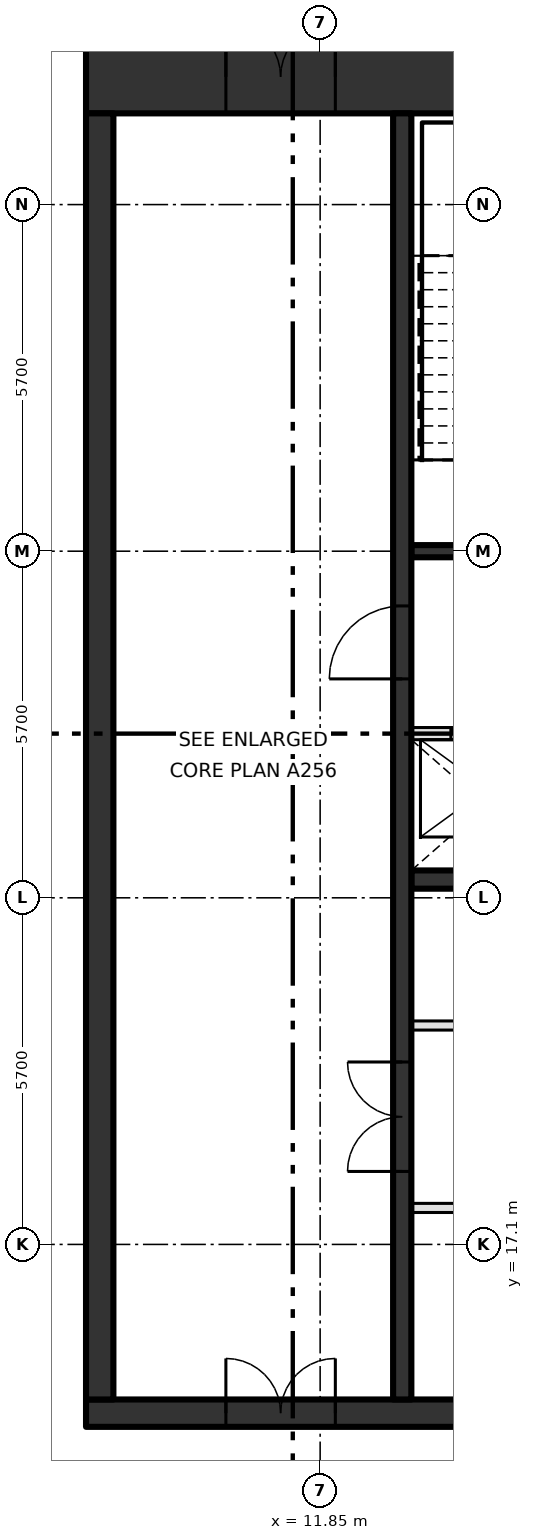
"""IFC4 building model, lengths in metres.
Left out: names, types, materials, properties, quantities, classifications, styles, units other than length and angle.
Written with IfcOpenShell. Run it as: python <this file> out.ifc"""

import sys

from ifc_helpers import new_model, si_unit, direction, frame, frame_2d, origin, place, context, subcontext, project, spatial, rectangle, extrude, element, fill, save


model = new_model("IFC4")
c1 = context("Model", 3, precision=1e-05, world=origin(), true_north=direction((0.0, 1.0)))
c2 = subcontext(c1, "Body", "Model", "MODEL_VIEW")
j1 = project(units=[si_unit("LENGTHUNIT", "METRE"), si_unit("PLANEANGLEUNIT", "RADIAN")], contexts=[c1])
p1 = place(None, origin())
s1 = spatial("IfcSite", under=j1, at=p1, CompositionType="ELEMENT")
p2 = place(p1, origin())
s2 = spatial("IfcBuilding", under=s1, at=p2, CompositionType="ELEMENT")
p3 = place(p2, frame((0.0, 0.0, 409.8)))
s3 = spatial("IfcBuildingStorey", under=s2, at=p3, CompositionType="ELEMENT", Elevation=409.8)
p4 = place(p3, frame((8.0, 14.325, -0.45), z_axis=(0.0, 0.0, 1.0), x_axis=(1.0, 0.0, 0.0)))
e1 = element("IfcWall", 1, at=p4, inside=s3, PredefinedType="SHEAR", context=c2, shape_type="SweptSolid", body=[
    extrude(rectangle(XDim=22.8, YDim=0.45, at=frame_2d((11.4, 0.0))), origin(), (0.0, 0.0, 1.0), 4.95),
])
p5 = place(p4, frame((2.3, 0.0, 0.45)))
e2 = element("IfcOpeningElement", 2, at=p5, cuts=e1, PredefinedType="OPENING", context=c2, shape_type="SweptSolid", body=[
    extrude(rectangle(XDim=1.8, YDim=2.1, at=frame_2d((0.9, 1.05))), frame((0.0, 0.235, 0.0), z_axis=(0.0, -1.0, 0.0), x_axis=(1.0, 0.0, 0.0)), (0.0, 0.0, 1.0), 0.47),
])
p6 = place(p3, frame((8.0, 36.3, -0.45), z_axis=(0.0, 0.0, 1.0), x_axis=(1.0, 0.0, 0.0)))
e3 = element("IfcWall", 3, at=p6, inside=s3, PredefinedType="SHEAR", context=c2, shape_type="SweptSolid", body=[
    extrude(rectangle(XDim=22.8, YDim=1.2, at=frame_2d((11.4, 0.0))), origin(), (0.0, 0.0, 1.0), 4.95),
])
p7 = place(p6, frame((2.3, 0.0, 0.45)))
e4 = element("IfcOpeningElement", 4, at=p7, cuts=e3, PredefinedType="OPENING", context=c2, shape_type="SweptSolid", body=[
    extrude(rectangle(XDim=1.8, YDim=2.1, at=frame_2d((0.9, 1.05))), frame((0.0, 0.61, 0.0), z_axis=(0.0, -1.0, 0.0), x_axis=(1.0, 0.0, 0.0)), (0.0, 0.0, 1.0), 1.22),
])
p8 = place(p3, frame((8.225, 14.55, -0.45), z_axis=(0.0, 0.0, 1.0), x_axis=(0.0, 1.0, 0.0)))
e5 = element("IfcWall", 5, at=p8, inside=s3, PredefinedType="SHEAR", context=c2, shape_type="SweptSolid", body=[
    extrude(rectangle(XDim=21.15, YDim=0.45, at=frame_2d((10.575, 0.0))), origin(), (0.0, 0.0, 1.0), 4.95),
])
p9 = place(p3, frame((13.35, 17.7, 0.0), z_axis=(0.0, 0.0, 1.0), x_axis=(1.0, 0.0, 0.0)))
e6 = element("IfcWall", 6, at=p9, inside=s3, PredefinedType="PARTITIONING", context=c2, shape_type="SweptSolid", body=[
    extrude(rectangle(XDim=13.425, YDim=0.15, at=frame_2d((6.712, 0.0))), origin(), (0.0, 0.0, 1.0), 4.5),
])
p10 = place(p9, frame((2.1, 0.0, 0.0)))
e7 = element("IfcOpeningElement", 7, at=p10, cuts=e6, PredefinedType="OPENING", context=c2, shape_type="SweptSolid", body=[
    extrude(rectangle(XDim=0.9, YDim=2.1, at=frame_2d((0.45, 1.05))), frame((0.0, 0.085, 0.0), z_axis=(0.0, -1.0, 0.0), x_axis=(1.0, 0.0, 0.0)), (0.0, 0.0, 1.0), 0.17),
])
p11 = place(p9, frame((8.85, 0.0, 0.0)))
e8 = element("IfcOpeningElement", 8, at=p11, cuts=e6, PredefinedType="OPENING", context=c2, shape_type="SweptSolid", body=[
    extrude(rectangle(XDim=0.9, YDim=2.1, at=frame_2d((0.45, 1.05))), frame((0.0, 0.085, 0.0), z_axis=(0.0, -1.0, 0.0), x_axis=(1.0, 0.0, 0.0)), (0.0, 0.0, 1.0), 0.17),
])
p12 = place(p3, frame((13.35, 20.7, 0.0), z_axis=(0.0, 0.0, 1.0), x_axis=(1.0, 0.0, 0.0)))
e9 = element("IfcWall", 9, at=p12, inside=s3, PredefinedType="PARTITIONING", context=c2, shape_type="SweptSolid", body=[
    extrude(rectangle(XDim=13.425, YDim=0.15, at=frame_2d((6.712, 0.0))), origin(), (0.0, 0.0, 1.0), 4.5),
])
p13 = place(p12, frame((4.8, 0.0, 0.0)))
e10 = element("IfcOpeningElement", 10, at=p13, cuts=e9, PredefinedType="OPENING", context=c2, shape_type="SweptSolid", body=[
    extrude(rectangle(XDim=0.9, YDim=2.1, at=frame_2d((0.45, 1.05))), frame((0.0, 0.085, 0.0), z_axis=(0.0, -1.0, 0.0), x_axis=(1.0, 0.0, 0.0)), (0.0, 0.0, 1.0), 0.17),
])
p14 = place(p12, frame((11.55, 0.0, 0.0)))
e11 = element("IfcOpeningElement", 11, at=p14, cuts=e9, PredefinedType="OPENING", context=c2, shape_type="SweptSolid", body=[
    extrude(rectangle(XDim=0.9, YDim=2.1, at=frame_2d((0.45, 1.05))), frame((0.0, 0.085, 0.0), z_axis=(0.0, -1.0, 0.0), x_axis=(1.0, 0.0, 0.0)), (0.0, 0.0, 1.0), 0.17),
])
p15 = place(p3, frame((13.35, 23.1, 0.0), z_axis=(0.0, 0.0, 1.0), x_axis=(1.0, 0.0, 0.0)))
e12 = element("IfcWall", 12, at=p15, inside=s3, PredefinedType="SHEAR", context=c2, shape_type="SweptSolid", body=[
    extrude(rectangle(XDim=17.0, YDim=0.3, at=frame_2d((8.5, 0.0))), origin(), (0.0, 0.0, 1.0), 4.5),
])
p16 = place(p3, frame((13.35, 25.5, 0.0), z_axis=(0.0, 0.0, 1.0), x_axis=(1.0, 0.0, 0.0)))
e13 = element("IfcWall", 13, at=p16, inside=s3, PredefinedType="SOLIDWALL", context=c2, shape_type="SweptSolid", body=[
    extrude(rectangle(XDim=17.0, YDim=0.2, at=frame_2d((8.5, 0.0))), origin(), (0.0, 0.0, 1.0), 4.5),
])
p17 = place(p16, frame((0.65, 0.0, 0.0)))
e14 = element("IfcOpeningElement", 14, at=p17, cuts=e13, PredefinedType="OPENING", context=c2, shape_type="SweptSolid", body=[
    extrude(rectangle(XDim=1.1, YDim=2.1, at=frame_2d((0.55, 1.05))), frame((0.0, 0.11, 0.0), z_axis=(0.0, -1.0, 0.0), x_axis=(1.0, 0.0, 0.0)), (0.0, 0.0, 1.0), 0.22),
])
p18 = place(p16, frame((3.35, 0.0, 0.0)))
e15 = element("IfcOpeningElement", 15, at=p18, cuts=e13, PredefinedType="OPENING", context=c2, shape_type="SweptSolid", body=[
    extrude(rectangle(XDim=1.1, YDim=2.1, at=frame_2d((0.55, 1.05))), frame((0.0, 0.11, 0.0), z_axis=(0.0, -1.0, 0.0), x_axis=(1.0, 0.0, 0.0)), (0.0, 0.0, 1.0), 0.22),
])
p19 = place(p16, frame((6.05, 0.0, 0.0)))
e16 = element("IfcOpeningElement", 16, at=p19, cuts=e13, PredefinedType="OPENING", context=c2, shape_type="SweptSolid", body=[
    extrude(rectangle(XDim=1.1, YDim=2.1, at=frame_2d((0.55, 1.05))), frame((0.0, 0.11, 0.0), z_axis=(0.0, -1.0, 0.0), x_axis=(1.0, 0.0, 0.0)), (0.0, 0.0, 1.0), 0.22),
])
p20 = place(p16, frame((8.75, 0.0, 0.0)))
e17 = element("IfcOpeningElement", 17, at=p20, cuts=e13, PredefinedType="OPENING", context=c2, shape_type="SweptSolid", body=[
    extrude(rectangle(XDim=1.1, YDim=2.1, at=frame_2d((0.55, 1.05))), frame((0.0, 0.11, 0.0), z_axis=(0.0, -1.0, 0.0), x_axis=(1.0, 0.0, 0.0)), (0.0, 0.0, 1.0), 0.22),
])
p21 = place(p16, frame((13.0, 0.0, 0.0)))
e18 = element("IfcOpeningElement", 18, at=p21, cuts=e13, PredefinedType="OPENING", context=c2, shape_type="SweptSolid", body=[
    extrude(rectangle(XDim=0.9, YDim=2.1, at=frame_2d((0.45, 1.05))), frame((0.0, 0.11, 0.0), z_axis=(0.0, -1.0, 0.0), x_axis=(1.0, 0.0, 0.0)), (0.0, 0.0, 1.0), 0.22),
])
p22 = place(p3, frame((13.35, 28.5, 0.0), z_axis=(0.0, 0.0, 1.0), x_axis=(1.0, 0.0, 0.0)))
e19 = element("IfcWall", 19, at=p22, inside=s3, PredefinedType="SOLIDWALL", context=c2, shape_type="SweptSolid", body=[
    extrude(rectangle(XDim=6.75, YDim=0.2, at=frame_2d((3.375, 0.0))), origin(), (0.0, 0.0, 1.0), 4.5),
])
p23 = place(p22, frame((0.95, 0.0, 0.0)))
e20 = element("IfcOpeningElement", 20, at=p23, cuts=e19, PredefinedType="OPENING", context=c2, shape_type="SweptSolid", body=[
    extrude(rectangle(XDim=1.2, YDim=2.1, at=frame_2d((0.6, 1.05))), frame((0.0, 0.11, 0.0), z_axis=(0.0, -1.0, 0.0), x_axis=(1.0, 0.0, 0.0)), (0.0, 0.0, 1.0), 0.22),
])
p24 = place(p22, frame((3.75, 0.0, 0.0)))
e21 = element("IfcOpeningElement", 21, at=p24, cuts=e19, PredefinedType="OPENING", context=c2, shape_type="SweptSolid", body=[
    extrude(rectangle(XDim=1.1, YDim=2.1, at=frame_2d((0.55, 1.05))), frame((0.0, 0.11, 0.0), z_axis=(0.0, -1.0, 0.0), x_axis=(1.0, 0.0, 0.0)), (0.0, 0.0, 1.0), 0.22),
])
p25 = place(p3, frame((13.2, 14.55, 0.0), z_axis=(0.0, 0.0, 1.0), x_axis=(0.0, 1.0, 0.0)))
e22 = element("IfcWall", 22, at=p25, inside=s3, PredefinedType="SHEAR", context=c2, shape_type="SweptSolid", body=[
    extrude(rectangle(XDim=21.15, YDim=0.3, at=frame_2d((10.575, 0.0))), origin(), (0.0, 0.0, 1.0), 4.5),
])
p26 = place(p25, frame((3.75, 0.0, 0.0)))
e23 = element("IfcOpeningElement", 23, at=p26, cuts=e22, PredefinedType="OPENING", context=c2, shape_type="SweptSolid", body=[
    extrude(rectangle(XDim=1.8, YDim=2.1, at=frame_2d((0.9, 1.05))), frame((0.0, 0.16, 0.0), z_axis=(0.0, -1.0, 0.0), x_axis=(1.0, 0.0, 0.0)), (0.0, 0.0, 1.0), 0.32),
])
p27 = place(p25, frame((11.85, 0.0, 0.0)))
e24 = element("IfcOpeningElement", 24, at=p27, cuts=e22, PredefinedType="OPENING", context=c2, shape_type="SweptSolid", body=[
    extrude(rectangle(XDim=1.2, YDim=2.1, at=frame_2d((0.6, 1.05))), frame((0.0, 0.16, 0.0), z_axis=(0.0, -1.0, 0.0), x_axis=(1.0, 0.0, 0.0)), (0.0, 0.0, 1.0), 0.32),
])
p28 = place(p17, origin())
e25 = element("IfcDoor", 25, at=p28, inside=s3, OperationType="SLIDING_TO_LEFT", PredefinedType="DOOR", context=c2, shape_type="SweptSolid", body=[
    extrude(rectangle(XDim=1.1, YDim=2.1, at=frame_2d((0.55, 1.05))), frame((0.0, 0.025, 0.0), z_axis=(0.0, -1.0, 0.0), x_axis=(1.0, 0.0, 0.0)), (0.0, 0.0, 1.0), 0.05),
])
fill(e14, e25)
p29 = place(p26, origin())
e26 = element("IfcDoor", 26, at=p29, inside=s3, OperationType="DOUBLE_DOOR_SINGLE_SWING", PredefinedType="DOOR", context=c2, shape_type="SweptSolid", body=[
    extrude(rectangle(XDim=1.8, YDim=2.1, at=frame_2d((0.9, 1.05))), frame((0.0, 0.025, 0.0), z_axis=(0.0, -1.0, 0.0), x_axis=(1.0, 0.0, 0.0)), (0.0, 0.0, 1.0), 0.05),
])
fill(e23, e26)
p30 = place(p27, origin())
e27 = element("IfcDoor", 27, at=p30, inside=s3, OperationType="SINGLE_SWING_LEFT", PredefinedType="DOOR", context=c2, shape_type="SweptSolid", body=[
    extrude(rectangle(XDim=1.2, YDim=2.1, at=frame_2d((0.6, 1.05))), frame((0.0, 0.025, 0.0), z_axis=(0.0, -1.0, 0.0), x_axis=(1.0, 0.0, 0.0)), (0.0, 0.0, 1.0), 0.05),
])
fill(e24, e27)
p31 = place(p7, origin())
e28 = element("IfcDoor", 28, at=p31, inside=s3, OperationType="DOUBLE_DOOR_SINGLE_SWING", PredefinedType="DOOR", context=c2, shape_type="SweptSolid", body=[
    extrude(rectangle(XDim=1.8, YDim=2.1, at=frame_2d((0.9, 1.05))), frame((0.0, 0.025, 0.0), z_axis=(0.0, -1.0, 0.0), x_axis=(1.0, 0.0, 0.0)), (0.0, 0.0, 1.0), 0.05),
])
fill(e4, e28)
p32 = place(p5, origin())
e29 = element("IfcDoor", 29, at=p32, inside=s3, OperationType="DOUBLE_DOOR_SINGLE_SWING", PredefinedType="DOOR", context=c2, shape_type="SweptSolid", body=[
    extrude(rectangle(XDim=1.8, YDim=2.1, at=frame_2d((0.9, 1.05))), frame((0.0, 0.025, 0.0), z_axis=(0.0, -1.0, 0.0), x_axis=(1.0, 0.0, 0.0)), (0.0, 0.0, 1.0), 0.05),
])
fill(e2, e29)
save(model, sys.argv[1])
